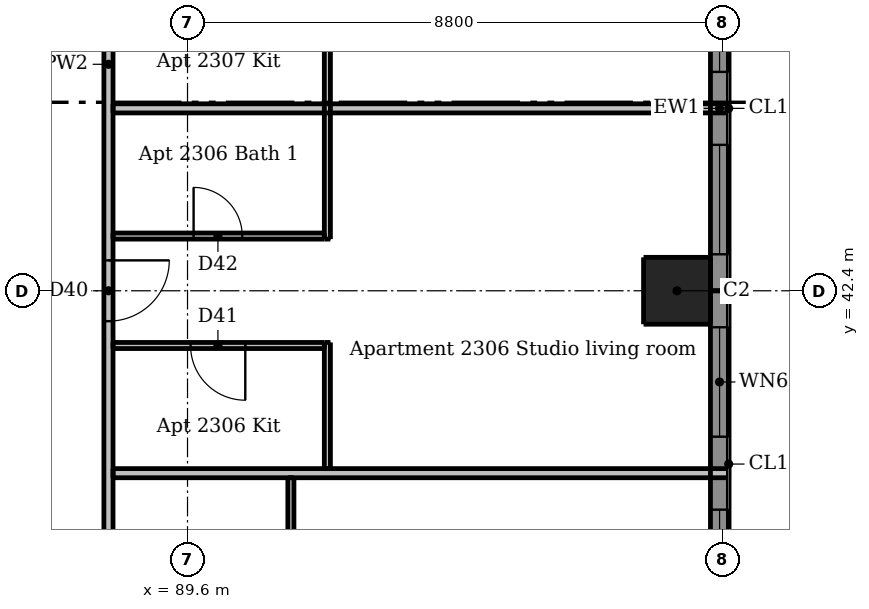
"""IFC4 building model, lengths in metres.
Left out: names, types, materials, properties, quantities, classifications, styles, units other than length and angle.
Written with IfcOpenShell. Run it as: python <this file> out.ifc"""

import sys

from ifc_helpers import new_model, si_unit, direction, frame, frame_2d, origin, origin_2d, place, context, subcontext, project, spatial, rectangle, extrude, element, fill, save


model = new_model("IFC4")
c1 = context("Model", 3, precision=1e-05, world=origin(), true_north=direction((0.0, 1.0)))
c2 = subcontext(c1, "Body", "Model", "MODEL_VIEW")
j1 = project(units=[si_unit("LENGTHUNIT", "METRE"), si_unit("PLANEANGLEUNIT", "RADIAN")], contexts=[c1])
p1 = place(None, origin())
s1 = spatial("IfcSite", under=j1, at=p1, CompositionType="ELEMENT")
p2 = place(p1, origin())
s2 = spatial("IfcBuilding", under=s1, at=p2, CompositionType="ELEMENT")
p3 = place(p2, frame((0.0, 0.0, 88.6)))
s3 = spatial("IfcBuildingStorey", under=s2, at=p3, CompositionType="ELEMENT", Elevation=88.6)
p4 = place(p3, frame((97.65, 42.4, 0.0), z_axis=(0.0, 0.0, 1.0), x_axis=(1.0, 0.0, 0.0)))
e1 = element("IfcColumn", 1, at=p4, inside=s3, PredefinedType="COLUMN", context=c2, shape_type="SweptSolid", body=[
    extrude(rectangle(XDim=1.1, YDim=1.1, at=origin_2d()), origin(), (0.0, 0.0, 1.0), 3.05),
])
p5 = place(p3, frame((98.35, 36.7, 0.0), z_axis=(0.0, 0.0, 1.0), x_axis=(0.0, 1.0, 0.0)))
e2 = element("IfcWall", 2, at=p5, inside=s3, PredefinedType="SOLIDWALL", context=c2, shape_type="SweptSolid", body=[
    extrude(rectangle(XDim=5.7, YDim=0.3, at=frame_2d((2.85, 0.0))), origin(), (0.0, 0.0, 1.0), 3.05),
])
p6 = place(p5, frame((0.3, 0.0, 0.15)))
e3 = element("IfcOpeningElement", 3, at=p6, cuts=e2, PredefinedType="OPENING", context=c2, shape_type="SweptSolid", body=[
    extrude(rectangle(XDim=1.8, YDim=2.1, at=frame_2d((0.9, 1.05))), frame((0.0, 0.16, 0.0), z_axis=(0.0, -1.0, 0.0), x_axis=(1.0, 0.0, 0.0)), (0.0, 0.0, 1.0), 0.32),
])
p7 = place(p5, frame((3.3, 0.0, 0.15)))
e4 = element("IfcOpeningElement", 4, at=p7, cuts=e2, PredefinedType="OPENING", context=c2, shape_type="SweptSolid", body=[
    extrude(rectangle(XDim=1.8, YDim=2.1, at=frame_2d((0.9, 1.05))), frame((0.0, 0.16, 0.0), z_axis=(0.0, -1.0, 0.0), x_axis=(1.0, 0.0, 0.0)), (0.0, 0.0, 1.0), 0.32),
])
p8 = place(p3, frame((98.35, 42.4, 0.0), z_axis=(0.0, 0.0, 1.0), x_axis=(0.0, 1.0, 0.0)))
e5 = element("IfcWall", 5, at=p8, inside=s3, PredefinedType="SOLIDWALL", context=c2, shape_type="SweptSolid", body=[
    extrude(rectangle(XDim=6.0, YDim=0.3, at=frame_2d((3.0, 0.0))), origin(), (0.0, 0.0, 1.0), 3.05),
])
p9 = place(p8, frame((0.6, 0.0, 0.15)))
e6 = element("IfcOpeningElement", 6, at=p9, cuts=e5, PredefinedType="OPENING", context=c2, shape_type="SweptSolid", body=[
    extrude(rectangle(XDim=1.8, YDim=2.1, at=frame_2d((0.9, 1.05))), frame((0.0, 0.16, 0.0), z_axis=(0.0, -1.0, 0.0), x_axis=(1.0, 0.0, 0.0)), (0.0, 0.0, 1.0), 0.32),
])
p10 = place(p8, frame((3.6, 0.0, 0.15)))
e7 = element("IfcOpeningElement", 7, at=p10, cuts=e5, PredefinedType="OPENING", context=c2, shape_type="SweptSolid", body=[
    extrude(rectangle(XDim=1.8, YDim=2.1, at=frame_2d((0.9, 1.05))), frame((0.0, 0.16, 0.0), z_axis=(0.0, -1.0, 0.0), x_axis=(1.0, 0.0, 0.0)), (0.0, 0.0, 1.0), 0.32),
])
p11 = place(p3, frame((91.3, 33.45, 0.0), z_axis=(0.0, 0.0, 1.0), x_axis=(0.0, 1.0, 0.0)))
e8 = element("IfcWall", 8, at=p11, inside=s3, PredefinedType="PARTITIONING", context=c2, shape_type="SweptSolid", body=[
    extrude(rectangle(XDim=5.875, YDim=0.1, at=frame_2d((2.938, 0.0))), origin(), (0.0, 0.0, 1.0), 3.05),
])
p12 = place(p11, frame((3.75, 0.0, 0.0)))
e9 = element("IfcOpeningElement", 9, at=p12, cuts=e8, PredefinedType="OPENING", context=c2, shape_type="SweptSolid", body=[
    extrude(rectangle(XDim=0.8, YDim=2.1, at=frame_2d((0.4, 1.05))), frame((0.0, 0.06, 0.0), z_axis=(0.0, -1.0, 0.0), x_axis=(1.0, 0.0, 0.0)), (0.0, 0.0, 1.0), 0.12),
])
p13 = place(p3, frame((91.9, 39.475, 0.0), z_axis=(0.0, 0.0, 1.0), x_axis=(0.0, 1.0, 0.0)))
e10 = element("IfcWall", 10, at=p13, inside=s3, PredefinedType="PARTITIONING", context=c2, shape_type="SweptSolid", body=[
    extrude(rectangle(XDim=2.075, YDim=0.1, at=frame_2d((1.038, 0.0))), origin(), (0.0, 0.0, 1.0), 3.05),
])
p14 = place(p3, frame((91.9, 43.25, 0.0), z_axis=(0.0, 0.0, 1.0), x_axis=(0.0, 1.0, 0.0)))
e11 = element("IfcWall", 11, at=p14, inside=s3, PredefinedType="PARTITIONING", context=c2, shape_type="SweptSolid", body=[
    extrude(rectangle(XDim=4.3, YDim=0.1, at=frame_2d((2.15, 0.0))), origin(), (0.0, 0.0, 1.0), 3.05),
])
p15 = place(p3, frame((88.375, 43.3, 0.0), z_axis=(0.0, 0.0, 1.0), x_axis=(1.0, 0.0, 0.0)))
e12 = element("IfcWall", 12, at=p15, inside=s3, PredefinedType="PARTITIONING", context=c2, shape_type="SweptSolid", body=[
    extrude(rectangle(XDim=3.475, YDim=0.1, at=frame_2d((1.738, 0.0))), origin(), (0.0, 0.0, 1.0), 3.05),
])
p16 = place(p15, frame((1.325, 0.0, 0.0)))
e13 = element("IfcOpeningElement", 13, at=p16, cuts=e12, PredefinedType="OPENING", context=c2, shape_type="SweptSolid", body=[
    extrude(rectangle(XDim=0.8, YDim=2.1, at=frame_2d((0.4, 1.05))), frame((0.0, 0.06, 0.0), z_axis=(0.0, -1.0, 0.0), x_axis=(1.0, 0.0, 0.0)), (0.0, 0.0, 1.0), 0.12),
])
p17 = place(p3, frame((91.85, 41.5, 0.0), z_axis=(0.0, 0.0, 1.0), x_axis=(-1.0, 0.0, 0.0)))
e14 = element("IfcWall", 14, at=p17, inside=s3, PredefinedType="PARTITIONING", context=c2, shape_type="SweptSolid", body=[
    extrude(rectangle(XDim=3.475, YDim=0.1, at=frame_2d((1.738, 0.0))), origin(), (0.0, 0.0, 1.0), 3.05),
])
p18 = place(p17, frame((1.3, 0.0, 0.0)))
e15 = element("IfcOpeningElement", 15, at=p18, cuts=e14, PredefinedType="OPENING", context=c2, shape_type="SweptSolid", body=[
    extrude(rectangle(XDim=0.9, YDim=2.1, at=frame_2d((0.45, 1.05))), frame((0.0, 0.06, 0.0), z_axis=(0.0, -1.0, 0.0), x_axis=(1.0, 0.0, 0.0)), (0.0, 0.0, 1.0), 0.12),
])
p19 = place(p3, frame((88.3, 60.475, 0.0), z_axis=(0.0, 0.0, 1.0), x_axis=(0.0, -1.0, 0.0)))
e16 = element("IfcWall", 16, at=p19, inside=s3, PredefinedType="PARTITIONING", context=c2, shape_type="SweptSolid", body=[
    extrude(rectangle(XDim=28.7, YDim=0.15, at=frame_2d((14.35, 0.0))), origin(), (0.0, 0.0, 1.0), 3.05),
])
p20 = place(p19, frame((27.425, 0.0, 0.0)))
e17 = element("IfcOpeningElement", 17, at=p20, cuts=e16, PredefinedType="OPENING", context=c2, shape_type="SweptSolid", body=[
    extrude(rectangle(XDim=1.0, YDim=2.1, at=frame_2d((0.5, 1.05))), frame((0.0, 0.085, 0.0), z_axis=(0.0, -1.0, 0.0), x_axis=(1.0, 0.0, 0.0)), (0.0, 0.0, 1.0), 0.17),
])
p21 = place(p19, frame((17.575, 0.0, 0.0)))
e18 = element("IfcOpeningElement", 18, at=p21, cuts=e16, PredefinedType="OPENING", context=c2, shape_type="SweptSolid", body=[
    extrude(rectangle(XDim=1.0, YDim=2.1, at=frame_2d((0.5, 1.05))), frame((0.0, 0.085, 0.0), z_axis=(0.0, -1.0, 0.0), x_axis=(1.0, 0.0, 0.0)), (0.0, 0.0, 1.0), 0.17),
])
p22 = place(p19, frame((11.575, 0.0, 0.0)))
e19 = element("IfcOpeningElement", 19, at=p22, cuts=e16, PredefinedType="OPENING", context=c2, shape_type="SweptSolid", body=[
    extrude(rectangle(XDim=1.0, YDim=2.1, at=frame_2d((0.5, 1.05))), frame((0.0, 0.085, 0.0), z_axis=(0.0, -1.0, 0.0), x_axis=(1.0, 0.0, 0.0)), (0.0, 0.0, 1.0), 0.17),
])
p23 = place(p19, frame((3.775, 0.0, 0.0)))
e20 = element("IfcOpeningElement", 20, at=p23, cuts=e16, PredefinedType="OPENING", context=c2, shape_type="SweptSolid", body=[
    extrude(rectangle(XDim=1.0, YDim=2.1, at=frame_2d((0.5, 1.05))), frame((0.0, 0.085, 0.0), z_axis=(0.0, -1.0, 0.0), x_axis=(1.0, 0.0, 0.0)), (0.0, 0.0, 1.0), 0.17),
])
for number, where, z_axis, x_axis in (
    (21, (88.375, 45.4, 0.0), (0.0, 0.0, 1.0), (1.0, 0.0, 0.0)),
    (22, (88.375, 39.4, 0.0), (0.0, 0.0, 1.0), (1.0, 0.0, 0.0)),
):
    element("IfcWall", number, at=place(p3, frame(where, z_axis=z_axis, x_axis=x_axis)), inside=s3, PredefinedType="PARTITIONING", context=c2, shape_type="SweptSolid", body=[
        extrude(rectangle(XDim=10.125, YDim=0.15, at=frame_2d((5.062, 0.0))), origin(), (0.0, 0.0, 1.0), 3.05),
    ])
p24 = place(p6, origin())
e23 = element("IfcWindow", 23, at=p24, inside=s3, PartitioningType="DOUBLE_PANEL_VERTICAL", PredefinedType="WINDOW", context=c2, shape_type="SweptSolid", body=[
    extrude(rectangle(XDim=1.8, YDim=2.1, at=frame_2d((0.9, 1.05))), frame((0.0, 0.03, 0.0), z_axis=(0.0, -1.0, 0.0), x_axis=(1.0, 0.0, 0.0)), (0.0, 0.0, 1.0), 0.06),
])
fill(e3, e23)
p25 = place(p7, origin())
e24 = element("IfcWindow", 24, at=p25, inside=s3, PartitioningType="DOUBLE_PANEL_VERTICAL", PredefinedType="WINDOW", context=c2, shape_type="SweptSolid", body=[
    extrude(rectangle(XDim=1.8, YDim=2.1, at=frame_2d((0.9, 1.05))), frame((0.0, 0.03, 0.0), z_axis=(0.0, -1.0, 0.0), x_axis=(1.0, 0.0, 0.0)), (0.0, 0.0, 1.0), 0.06),
])
fill(e4, e24)
p26 = place(p9, origin())
e25 = element("IfcWindow", 25, at=p26, inside=s3, PartitioningType="DOUBLE_PANEL_VERTICAL", PredefinedType="WINDOW", context=c2, shape_type="SweptSolid", body=[
    extrude(rectangle(XDim=1.8, YDim=2.1, at=frame_2d((0.9, 1.05))), frame((0.0, 0.03, 0.0), z_axis=(0.0, -1.0, 0.0), x_axis=(1.0, 0.0, 0.0)), (0.0, 0.0, 1.0), 0.06),
])
fill(e6, e25)
p27 = place(p10, origin())
e26 = element("IfcWindow", 26, at=p27, inside=s3, PartitioningType="DOUBLE_PANEL_VERTICAL", PredefinedType="WINDOW", context=c2, shape_type="SweptSolid", body=[
    extrude(rectangle(XDim=1.8, YDim=2.1, at=frame_2d((0.9, 1.05))), frame((0.0, 0.03, 0.0), z_axis=(0.0, -1.0, 0.0), x_axis=(1.0, 0.0, 0.0)), (0.0, 0.0, 1.0), 0.06),
])
fill(e7, e26)
p28 = place(p21, origin())
e27 = element("IfcDoor", 27, at=p28, inside=s3, OperationType="SINGLE_SWING_LEFT", PredefinedType="DOOR", context=c2, shape_type="SweptSolid", body=[
    extrude(rectangle(XDim=1.0, YDim=2.1, at=frame_2d((0.5, 1.05))), frame((0.0, 0.025, 0.0), z_axis=(0.0, -1.0, 0.0), x_axis=(1.0, 0.0, 0.0)), (0.0, 0.0, 1.0), 0.05),
])
fill(e18, e27)
p29 = place(p18, origin())
e28 = element("IfcDoor", 28, at=p29, inside=s3, OperationType="SINGLE_SWING_LEFT", PredefinedType="DOOR", context=c2, shape_type="SweptSolid", body=[
    extrude(rectangle(XDim=0.9, YDim=2.1, at=frame_2d((0.45, 1.05))), frame((0.0, 0.025, 0.0), z_axis=(0.0, -1.0, 0.0), x_axis=(1.0, 0.0, 0.0)), (0.0, 0.0, 1.0), 0.05),
])
fill(e15, e28)
p30 = place(p16, origin())
e29 = element("IfcDoor", 29, at=p30, inside=s3, OperationType="SINGLE_SWING_LEFT", PredefinedType="DOOR", context=c2, shape_type="SweptSolid", body=[
    extrude(rectangle(XDim=0.8, YDim=2.1, at=frame_2d((0.4, 1.05))), frame((0.0, 0.025, 0.0), z_axis=(0.0, -1.0, 0.0), x_axis=(1.0, 0.0, 0.0)), (0.0, 0.0, 1.0), 0.05),
])
fill(e13, e29)
save(model, sys.argv[1])
